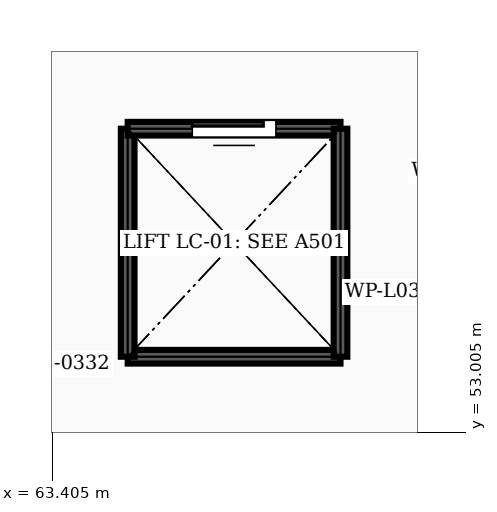
"""IFC4 building model, lengths in metres.
Left out: names, types, materials, properties, quantities, classifications, styles, units other than length and angle.
Written with IfcOpenShell. Run it as: python <this file> out.ifc"""

import sys

from ifc_helpers import new_model, si_unit, direction, frame, frame_2d, origin, place, context, subcontext, project, spatial, rectangle, extrude, element, fill, save


model = new_model("IFC4")
c1 = context("Model", 3, precision=1e-05, world=origin(), true_north=direction((0.0, 1.0)))
c2 = subcontext(c1, "Body", "Model", "MODEL_VIEW")
j1 = project(units=[si_unit("LENGTHUNIT", "METRE"), si_unit("PLANEANGLEUNIT", "RADIAN")], contexts=[c1])
p1 = place(None, origin())
s1 = spatial("IfcSite", under=j1, at=p1, CompositionType="ELEMENT")
p2 = place(p1, origin())
s2 = spatial("IfcBuilding", under=s1, at=p2, CompositionType="ELEMENT")
p3 = place(p2, frame((0.0, 0.0, 12.3)))
s3 = spatial("IfcBuildingStorey", under=s2, at=p3, CompositionType="ELEMENT", Elevation=12.3)
p4 = place(p3, frame((67.2, 54.0, 0.0), z_axis=(0.0, 0.0, 1.0), x_axis=(-1.0, 0.0, 0.0)))
e1 = element("IfcWall", 1, at=p4, inside=s3, PredefinedType="SHEAR", context=c2, shape_type="SweptSolid", body=[
    extrude(rectangle(XDim=2.8, YDim=0.18, at=frame_2d((1.4, 0.0))), origin(), (0.0, 0.0, 1.0), 3.59),
])
p5 = place(p3, frame((64.4, 54.0, 0.0), z_axis=(0.0, 0.0, 1.0), x_axis=(0.0, 1.0, 0.0)))
e2 = element("IfcWall", 2, at=p5, inside=s3, PredefinedType="SHEAR", context=c2, shape_type="SweptSolid", body=[
    extrude(rectangle(XDim=3.0, YDim=0.18, at=frame_2d((1.5, 0.0))), origin(), (0.0, 0.0, 1.0), 3.59),
])
p6 = place(p3, frame((64.4, 57.0, 0.0), z_axis=(0.0, 0.0, 1.0), x_axis=(1.0, 0.0, 0.0)))
e3 = element("IfcWall", 3, at=p6, inside=s3, PredefinedType="SHEAR", context=c2, shape_type="SweptSolid", body=[
    extrude(rectangle(XDim=2.8, YDim=0.18, at=frame_2d((1.4, 0.0))), origin(), (0.0, 0.0, 1.0), 3.59),
])
p7 = place(p6, frame((0.85, 0.0, 0.0)))
e4 = element("IfcOpeningElement", 4, at=p7, cuts=e3, PredefinedType="OPENING", context=c2, shape_type="SweptSolid", body=[
    extrude(rectangle(XDim=1.1, YDim=2.15, at=frame_2d((0.55, 1.075))), frame((0.0, 0.1, 0.0), z_axis=(0.0, -1.0, 0.0), x_axis=(1.0, 0.0, 0.0)), (0.0, 0.0, 1.0), 0.2),
])
p8 = place(p3, frame((67.2, 57.0, 0.0), z_axis=(0.0, 0.0, 1.0), x_axis=(0.0, -1.0, 0.0)))
e5 = element("IfcWall", 5, at=p8, inside=s3, PredefinedType="SHEAR", context=c2, shape_type="SweptSolid", body=[
    extrude(rectangle(XDim=3.0, YDim=0.18, at=frame_2d((1.5, 0.0))), origin(), (0.0, 0.0, 1.0), 3.59),
])
p9 = place(p3, frame((68.74, 54.85, 0.0), z_axis=(0.0, 0.0, 1.0), x_axis=(-1.0, 0.0, 0.0)))
e6 = element("IfcWall", 6, at=p9, inside=s3, PredefinedType="PARTITIONING", context=c2, shape_type="SweptSolid", body=[
    extrude(rectangle(XDim=1.24, YDim=0.12, at=frame_2d((0.62, 0.0))), origin(), (0.0, 0.0, 1.0), 3.59),
])
p10 = place(p3, frame((64.1, 53.9, 0.0), z_axis=(0.0, 0.0, 1.0), x_axis=(-1.0, 0.0, 0.0)))
e7 = element("IfcWall", 7, at=p10, inside=s3, PredefinedType="PARTITIONING", context=c2, shape_type="SweptSolid", body=[
    extrude(rectangle(XDim=1.6, YDim=0.135, at=frame_2d((0.8, 0.0))), origin(), (0.0, 0.0, 1.0), 3.59),
])
p11 = place(p7, origin())
e8 = element("IfcDoor", 8, at=p11, inside=s3, OperationType="SLIDING_TO_LEFT", PredefinedType="DOOR", context=c2, shape_type="SweptSolid", body=[
    extrude(rectangle(XDim=1.1, YDim=2.15, at=frame_2d((0.55, 1.075))), frame((0.0, 0.025, 0.0), z_axis=(0.0, -1.0, 0.0), x_axis=(1.0, 0.0, 0.0)), (0.0, 0.0, 1.0), 0.05),
])
fill(e4, e8)
save(model, sys.argv[1])
